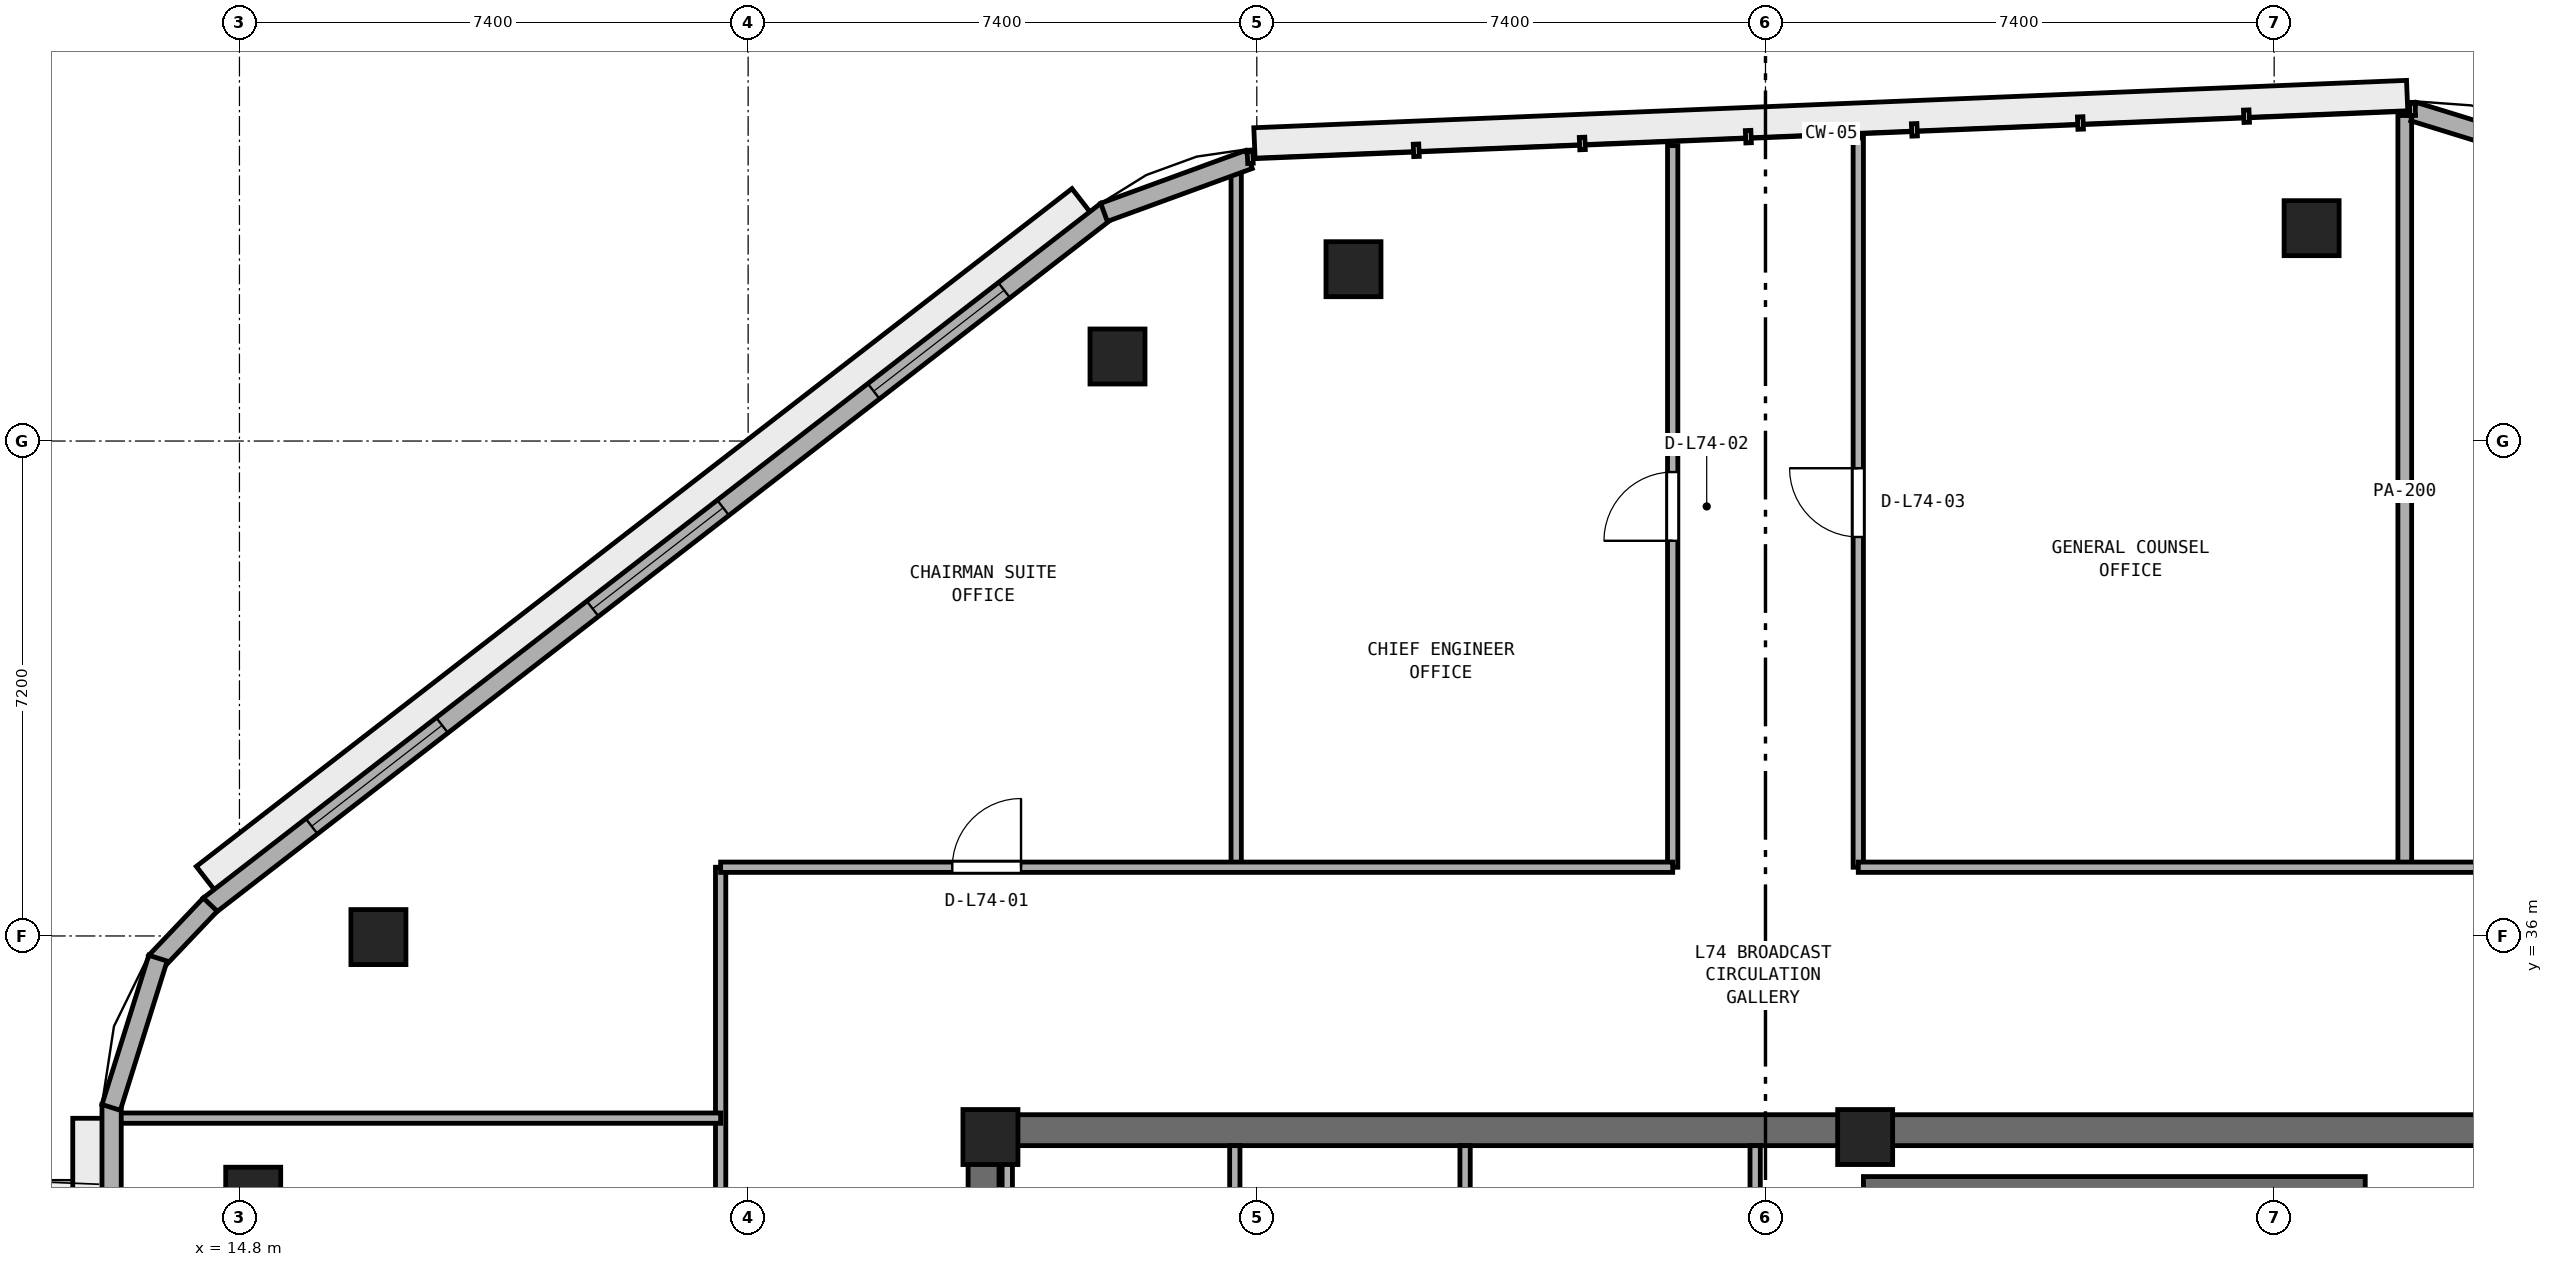
"""IFC4 building model, lengths in metres.
Left out: names, types, materials, properties, quantities, classifications, styles, units other than length and angle.
Written with IfcOpenShell. Run it as: python <this file> out.ifc"""

import sys

from ifc_helpers import new_model, si_unit, direction, frame, frame_2d, origin, origin_2d, place, context, subcontext, project, spatial, rectangle, extrude, element, fill, save


model = new_model("IFC4")
c1 = context("Model", 3, precision=1e-05, world=origin(), true_north=direction((0.0, 1.0)))
c2 = subcontext(c1, "Body", "Model", "MODEL_VIEW")
j1 = project(units=[si_unit("LENGTHUNIT", "METRE"), si_unit("PLANEANGLEUNIT", "RADIAN")], contexts=[c1])
p1 = place(None, origin())
s1 = spatial("IfcSite", under=j1, at=p1, CompositionType="ELEMENT")
p2 = place(p1, origin())
s2 = spatial("IfcBuilding", under=s1, at=p2, CompositionType="ELEMENT")
p3 = place(p2, frame((0.0, 0.0, 289.6)))
s3 = spatial("IfcBuildingStorey", under=s2, at=p3, CompositionType="ELEMENT", Elevation=289.6)
p4 = place(p3, frame((25.4, 33.175, 0.0), z_axis=(0.0, 0.0, 1.0), x_axis=(1.0, 0.0, 0.0)))
e1 = element("IfcWall", 1, at=p4, inside=s3, PredefinedType="SHEAR", context=c2, shape_type="SweptSolid", body=[
    extrude(rectangle(XDim=23.2, YDim=0.45, at=frame_2d((11.6, 0.0))), origin(), (0.0, 0.0, 1.0), 3.54),
])
p5 = place(p3, frame((25.625, 17.45, 0.0), z_axis=(0.0, 0.0, 1.0), x_axis=(0.0, 1.0, 0.0)))
e2 = element("IfcWall", 2, at=p5, inside=s3, PredefinedType="SHEAR", context=c2, shape_type="SweptSolid", body=[
    extrude(rectangle(XDim=15.5, YDim=0.45, at=frame_2d((7.75, 0.0))), origin(), (0.0, 0.0, 1.0), 3.54),
])
p6 = place(p5, frame((7.0, 0.0, 0.0)))
e3 = element("IfcOpeningElement", 3, at=p6, cuts=e2, PredefinedType="OPENING", context=c2, shape_type="SweptSolid", body=[
    extrude(rectangle(XDim=1.5, YDim=2.15, at=frame_2d((0.75, 1.075))), frame((0.0, 0.235, 0.0), z_axis=(0.0, -1.0, 0.0), x_axis=(1.0, 0.0, 0.0)), (0.0, 0.0, 1.0), 0.47),
])
for number, where, z_axis, x_axis in (
    (4, (38.45, 33.075, 0.0), (0.0, 0.0, 1.0), (1.0, 0.0, 0.0)),
    (5, (25.725, 33.075, 0.0), (0.0, 0.0, 1.0), (1.0, 0.0, 0.0)),
):
    element("IfcColumn", number, at=place(p3, frame(where, z_axis=z_axis, x_axis=x_axis)), inside=s3, PredefinedType="PILASTER", context=c2, shape_type="SweptSolid", body=[
        extrude(rectangle(XDim=0.8, YDim=0.8, at=origin_2d()), origin(), (0.0, 0.0, 1.0), 3.8),
    ])
for number, where, z_axis, x_axis in (
    (6, (44.945, 46.297, 0.0), (0.0, 0.0, 1.0), (1.0, 0.0, 0.0)),
    (7, (31.007, 45.7, 0.0), (0.0, 0.0, 1.0), (1.0, 0.0, 0.0)),
    (8, (27.573, 44.43, 0.0), (0.0, 0.0, 1.0), (1.0, 0.0, 0.0)),
    (9, (16.822, 35.984, 0.0), (0.0, 0.0, 1.0), (1.0, 0.0, 0.0)),
    (10, (15.0, 32.236, 0.0), (0.0, 0.0, 1.0), (1.0, 0.0, 0.0)),
):
    element("IfcColumn", number, at=place(p3, frame(where, z_axis=z_axis, x_axis=x_axis)), inside=s3, PredefinedType="COLUMN", context=c2, shape_type="SweptSolid", body=[
        extrude(rectangle(XDim=0.8, YDim=0.8, at=origin_2d()), origin(), (0.0, 0.0, 1.0), 3.8),
    ])
p7 = place(p3, frame((38.425, 32.375, 0.0), z_axis=(0.0, 0.0, 1.0), x_axis=(1.0, 0.0, 0.0)))
e11 = element("IfcWall", 11, at=p7, inside=s3, PredefinedType="SHEAR", context=c2, shape_type="SweptSolid", body=[
    extrude(rectangle(XDim=7.3, YDim=0.25, at=frame_2d((3.65, 0.0))), origin(), (0.0, 0.0, 1.0), 3.54),
])
p8 = place(p3, frame((25.97, 30.65, 0.0), z_axis=(0.0, 0.0, 1.0), x_axis=(0.0, 1.0, 0.0)))
e12 = element("IfcWall", 12, at=p8, inside=s3, PredefinedType="PARTITIONING", context=c2, shape_type="SweptSolid", body=[
    extrude(rectangle(XDim=2.3, YDim=0.15, at=frame_2d((1.15, 0.0))), origin(), (0.0, 0.0, 1.0), 2.64),
])
for number, where, z_axis, x_axis in (
    (13, (29.28, 30.65, 0.0), (0.0, 0.0, 1.0), (0.0, 1.0, 0.0)),
    (14, (32.63, 30.65, 0.0), (0.0, 0.0, 1.0), (0.0, 1.0, 0.0)),
    (15, (36.85, 30.65, 0.0), (0.0, 0.0, 1.0), (0.0, 1.0, 0.0)),
):
    element("IfcWall", number, at=place(p3, frame(where, z_axis=z_axis, x_axis=x_axis)), inside=s3, PredefinedType="PARTITIONING", context=c2, shape_type="SweptSolid", body=[
        extrude(rectangle(XDim=2.3, YDim=0.15, at=frame_2d((1.15, 0.0))), origin(), (0.0, 0.0, 1.0), 3.54),
    ])
p9 = place(p3, frame((46.3, 37.0, 0.0), z_axis=(0.0, 0.0, 1.0), x_axis=(0.0, 1.0, 0.0)))
e16 = element("IfcWall", 16, at=p9, inside=s3, PredefinedType="PARTITIONING", context=c2, shape_type="SweptSolid", body=[
    extrude(rectangle(XDim=10.935, YDim=0.2, at=frame_2d((5.468, 0.0))), origin(), (0.0, 0.0, 1.0), 3.54),
])
p10 = place(p3, frame((38.35, 37.0, 0.0), z_axis=(0.0, 0.0, 1.0), x_axis=(0.0, 1.0, 0.0)))
e17 = element("IfcWall", 17, at=p10, inside=s3, PredefinedType="PARTITIONING", context=c2, shape_type="SweptSolid", body=[
    extrude(rectangle(XDim=10.609, YDim=0.15, at=frame_2d((5.304, 0.0))), origin(), (0.0, 0.0, 1.0), 3.54),
])
p11 = place(p10, frame((4.804, 0.0, 0.0)))
e18 = element("IfcOpeningElement", 18, at=p11, cuts=e17, PredefinedType="OPENING", context=c2, shape_type="SweptSolid", body=[
    extrude(rectangle(XDim=1.0, YDim=2.12, at=frame_2d((0.5, 1.06))), frame((0.0, 0.085, 0.0), z_axis=(0.0, -1.0, 0.0), x_axis=(1.0, 0.0, 0.0)), (0.0, 0.0, 1.0), 0.17),
])
p12 = place(p3, frame((35.65, 37.0, 0.0), z_axis=(0.0, 0.0, 1.0), x_axis=(0.0, 1.0, 0.0)))
e19 = element("IfcWall", 19, at=p12, inside=s3, PredefinedType="PARTITIONING", context=c2, shape_type="SweptSolid", body=[
    extrude(rectangle(XDim=10.498, YDim=0.15, at=frame_2d((5.249, 0.0))), origin(), (0.0, 0.0, 1.0), 3.54),
])
p13 = place(p12, frame((4.749, 0.0, 0.0)))
e20 = element("IfcOpeningElement", 20, at=p13, cuts=e19, PredefinedType="OPENING", context=c2, shape_type="SweptSolid", body=[
    extrude(rectangle(XDim=1.0, YDim=2.12, at=frame_2d((0.5, 1.06))), frame((0.0, 0.085, 0.0), z_axis=(0.0, -1.0, 0.0), x_axis=(1.0, 0.0, 0.0)), (0.0, 0.0, 1.0), 0.17),
])
p14 = place(p3, frame((29.3, 37.0, 0.0), z_axis=(0.0, 0.0, 1.0), x_axis=(0.0, 1.0, 0.0)))
e21 = element("IfcWall", 21, at=p14, inside=s3, PredefinedType="PARTITIONING", context=c2, shape_type="SweptSolid", body=[
    extrude(rectangle(XDim=10.216, YDim=0.15, at=frame_2d((5.108, 0.0))), origin(), (0.0, 0.0, 1.0), 3.54),
])
p15 = place(p3, frame((21.8, 7.79, 0.0), z_axis=(0.0, 0.0, 1.0), x_axis=(0.0, 1.0, 0.0)))
e22 = element("IfcWall", 22, at=p15, inside=s3, PredefinedType="PARTITIONING", context=c2, shape_type="SweptSolid", body=[
    extrude(rectangle(XDim=29.21, YDim=0.15, at=frame_2d((14.605, 0.0))), origin(), (0.0, 0.0, 1.0), 3.54),
])
p16 = place(p15, frame((9.76, 0.0, 0.0)))
e23 = element("IfcOpeningElement", 23, at=p16, cuts=e22, PredefinedType="OPENING", context=c2, shape_type="SweptSolid", body=[
    extrude(rectangle(XDim=0.9, YDim=2.1, at=frame_2d((0.45, 1.05))), frame((0.0, 0.085, 0.0), z_axis=(0.0, -1.0, 0.0), x_axis=(1.0, 0.0, 0.0)), (0.0, 0.0, 1.0), 0.17),
])
p17 = place(p15, frame((18.11, 0.0, 0.0)))
e24 = element("IfcOpeningElement", 24, at=p17, cuts=e22, PredefinedType="OPENING", context=c2, shape_type="SweptSolid", body=[
    extrude(rectangle(XDim=0.9, YDim=2.1, at=frame_2d((0.45, 1.05))), frame((0.0, 0.085, 0.0), z_axis=(0.0, -1.0, 0.0), x_axis=(1.0, 0.0, 0.0)), (0.0, 0.0, 1.0), 0.17),
])
p18 = place(p15, frame((23.485, 0.0, 0.0)))
e25 = element("IfcOpeningElement", 25, at=p18, cuts=e22, PredefinedType="OPENING", context=c2, shape_type="SweptSolid", body=[
    extrude(rectangle(XDim=0.9, YDim=2.1, at=frame_2d((0.45, 1.05))), frame((0.0, 0.085, 0.0), z_axis=(0.0, -1.0, 0.0), x_axis=(1.0, 0.0, 0.0)), (0.0, 0.0, 1.0), 0.17),
])
p19 = place(p3, frame((13.005, 33.35, 0.0), z_axis=(0.0, 0.0, 1.0), x_axis=(1.0, 0.0, 0.0)))
e26 = element("IfcWall", 26, at=p19, inside=s3, PredefinedType="PARTITIONING", context=c2, shape_type="SweptSolid", body=[
    extrude(rectangle(XDim=8.795, YDim=0.15, at=frame_2d((4.397, 0.0))), origin(), (0.0, 0.0, 1.0), 3.54),
])
p20 = place(p3, frame((21.8, 37.0, 0.0), z_axis=(0.0, 0.0, 1.0), x_axis=(1.0, 0.0, 0.0)))
e27 = element("IfcWall", 27, at=p20, inside=s3, PredefinedType="PARTITIONING", context=c2, shape_type="SweptSolid", body=[
    extrude(rectangle(XDim=13.85, YDim=0.15, at=frame_2d((6.925, 0.0))), origin(), (0.0, 0.0, 1.0), 3.54),
])
p21 = place(p20, frame((3.37, 0.0, 0.0)))
e28 = element("IfcOpeningElement", 28, at=p21, cuts=e27, PredefinedType="OPENING", context=c2, shape_type="SweptSolid", body=[
    extrude(rectangle(XDim=1.0, YDim=2.12, at=frame_2d((0.5, 1.06))), frame((0.0, 0.085, 0.0), z_axis=(0.0, -1.0, 0.0), x_axis=(1.0, 0.0, 0.0)), (0.0, 0.0, 1.0), 0.17),
])
p22 = place(p3, frame((38.35, 37.0, 0.0), z_axis=(0.0, 0.0, 1.0), x_axis=(1.0, 0.0, 0.0)))
e29 = element("IfcWall", 29, at=p22, inside=s3, PredefinedType="PARTITIONING", context=c2, shape_type="SweptSolid", body=[
    extrude(rectangle(XDim=13.85, YDim=0.15, at=frame_2d((6.925, 0.0))), origin(), (0.0, 0.0, 1.0), 3.54),
])
p23 = place(p22, frame((10.28, 0.0, 0.0)))
e30 = element("IfcOpeningElement", 30, at=p23, cuts=e29, PredefinedType="OPENING", context=c2, shape_type="SweptSolid", body=[
    extrude(rectangle(XDim=1.0, YDim=2.12, at=frame_2d((0.5, 1.06))), frame((0.0, 0.085, 0.0), z_axis=(0.0, -1.0, 0.0), x_axis=(1.0, 0.0, 0.0)), (0.0, 0.0, 1.0), 0.17),
])
p24 = place(p3, frame((27.415, 46.547, 0.0), z_axis=(0.0, 0.0, 1.0), x_axis=(-0.790789745248, -0.612087884875, 0.0)))
e31 = element("IfcWall", 31, at=p24, inside=s3, PredefinedType="STANDARD", context=c2, shape_type="SweptSolid", body=[
    extrude(rectangle(XDim=16.509, YDim=0.28, at=frame_2d((8.254, 0.0))), origin(), (0.0, 0.0, 1.0), 3.54),
])
p25 = place(p24, frame((1.885, 0.0, 0.9)))
e32 = element("IfcOpeningElement", 32, at=p25, cuts=e31, PredefinedType="OPENING", context=c2, shape_type="SweptSolid", body=[
    extrude(rectangle(XDim=2.4, YDim=1.75, at=frame_2d((1.2, 0.875))), frame((0.0, 0.15, 0.0), z_axis=(0.0, -1.0, 0.0), x_axis=(1.0, 0.0, 0.0)), (0.0, 0.0, 1.0), 0.3),
])
p26 = place(p24, frame((7.055, 0.0, 0.9)))
e33 = element("IfcOpeningElement", 33, at=p26, cuts=e31, PredefinedType="OPENING", context=c2, shape_type="SweptSolid", body=[
    extrude(rectangle(XDim=2.4, YDim=1.75, at=frame_2d((1.2, 0.875))), frame((0.0, 0.15, 0.0), z_axis=(0.0, -1.0, 0.0), x_axis=(1.0, 0.0, 0.0)), (0.0, 0.0, 1.0), 0.3),
])
p27 = place(p24, frame((12.224, 0.0, 0.9)))
e34 = element("IfcOpeningElement", 34, at=p27, cuts=e31, PredefinedType="OPENING", context=c2, shape_type="SweptSolid", body=[
    extrude(rectangle(XDim=2.4, YDim=1.75, at=frame_2d((1.2, 0.875))), frame((0.0, 0.15, 0.0), z_axis=(0.0, -1.0, 0.0), x_axis=(1.0, 0.0, 0.0)), (0.0, 0.0, 1.0), 0.3),
])
p28 = place(p3, frame((12.94, 33.548, 0.0), z_axis=(0.0, 0.0, 1.0), x_axis=(0.0, -1.0, 0.0)))
e35 = element("IfcWall", 35, at=p28, inside=s3, PredefinedType="STANDARD", context=c2, shape_type="SweptSolid", body=[
    extrude(rectangle(XDim=17.496, YDim=0.28, at=frame_2d((8.748, 0.0))), origin(), (0.0, 0.0, 1.0), 3.54),
])
p29 = place(p28, frame((8.198, 0.0, 0.0)))
e36 = element("IfcOpeningElement", 36, at=p29, cuts=e35, PredefinedType="OPENING", context=c2, shape_type="SweptSolid", body=[
    extrude(rectangle(XDim=1.1, YDim=2.2, at=frame_2d((0.55, 1.1))), frame((0.0, 0.15, 0.0), z_axis=(0.0, -1.0, 0.0), x_axis=(1.0, 0.0, 0.0)), (0.0, 0.0, 1.0), 0.3),
])
p30 = place(p28, frame((13.047, 0.0, 0.9)))
e37 = element("IfcOpeningElement", 37, at=p30, cuts=e35, PredefinedType="OPENING", context=c2, shape_type="SweptSolid", body=[
    extrude(rectangle(XDim=2.4, YDim=1.75, at=frame_2d((1.2, 0.875))), frame((0.0, 0.15, 0.0), z_axis=(0.0, -1.0, 0.0), x_axis=(1.0, 0.0, 0.0)), (0.0, 0.0, 1.0), 0.3),
])
p31 = place(p3, frame((48.79, 47.264, 0.0), z_axis=(0.0, 0.0, 1.0), x_axis=(-0.955575823363, 0.294745391489, 0.0)))
e38 = element("IfcWall", 38, at=p31, inside=s3, PredefinedType="STANDARD", context=c2, shape_type="SweptSolid", body=[
    extrude(rectangle(XDim=2.471, YDim=0.28, at=frame_2d((1.235, 0.0))), origin(), (0.0, 0.0, 1.0), 3.54),
])
p32 = place(p3, frame((29.486, 47.296, 0.0), z_axis=(0.0, 0.0, 1.0), x_axis=(-0.939434048497, -0.342729731019, 0.0)))
e39 = element("IfcWall", 39, at=p32, inside=s3, PredefinedType="STANDARD", context=c2, shape_type="SweptSolid", body=[
    extrude(rectangle(XDim=2.245, YDim=0.28, at=frame_2d((1.122, 0.0))), origin(), (0.0, 0.0, 1.0), 3.54),
])
p33 = place(p3, frame((14.375, 36.457, 0.0), z_axis=(0.0, 0.0, 1.0), x_axis=(-0.68895569752, -0.724803453948, 0.0)))
e40 = element("IfcWall", 40, at=p33, inside=s3, PredefinedType="STANDARD", context=c2, shape_type="SweptSolid", body=[
    extrude(rectangle(XDim=1.151, YDim=0.28, at=frame_2d((0.575, 0.0))), origin(), (0.0, 0.0, 1.0), 3.54),
])
p34 = place(p3, frame((13.615, 35.677, 0.0), z_axis=(0.0, 0.0, 1.0), x_axis=(-0.299374552426, -0.954135670311, 0.0)))
e41 = element("IfcWall", 41, at=p34, inside=s3, PredefinedType="STANDARD", context=c2, shape_type="SweptSolid", body=[
    extrude(rectangle(XDim=2.275, YDim=0.28, at=frame_2d((1.138, 0.0))), origin(), (0.0, 0.0, 1.0), 3.54),
])
p35 = place(p21, origin())
e42 = element("IfcDoor", 42, at=p35, inside=s3, OperationType="SINGLE_SWING_RIGHT", PredefinedType="DOOR", context=c2, shape_type="SweptSolid", body=[
    extrude(rectangle(XDim=1.0, YDim=2.12, at=frame_2d((0.5, 1.06))), frame((0.0, 0.025, 0.0), z_axis=(0.0, -1.0, 0.0), x_axis=(1.0, 0.0, 0.0)), (0.0, 0.0, 1.0), 0.05),
])
fill(e28, e42)
p36 = place(p13, origin())
e43 = element("IfcDoor", 43, at=p36, inside=s3, OperationType="SINGLE_SWING_LEFT", PredefinedType="DOOR", context=c2, shape_type="SweptSolid", body=[
    extrude(rectangle(XDim=1.0, YDim=2.12, at=frame_2d((0.5, 1.06))), frame((0.0, 0.025, 0.0), z_axis=(0.0, -1.0, 0.0), x_axis=(1.0, 0.0, 0.0)), (0.0, 0.0, 1.0), 0.05),
])
fill(e20, e43)
p37 = place(p11, origin())
e44 = element("IfcDoor", 44, at=p37, inside=s3, OperationType="SINGLE_SWING_RIGHT", PredefinedType="DOOR", context=c2, shape_type="SweptSolid", body=[
    extrude(rectangle(XDim=1.0, YDim=2.12, at=frame_2d((0.5, 1.06))), frame((0.0, 0.025, 0.0), z_axis=(0.0, -1.0, 0.0), x_axis=(1.0, 0.0, 0.0)), (0.0, 0.0, 1.0), 0.05),
])
fill(e18, e44)
p38 = place(p25, origin())
e45 = element("IfcWindow", 45, at=p38, inside=s3, PartitioningType="SINGLE_PANEL", PredefinedType="WINDOW", context=c2, shape_type="SweptSolid", body=[
    extrude(rectangle(XDim=2.4, YDim=1.75, at=frame_2d((1.2, 0.875))), frame((0.0, 0.03, 0.0), z_axis=(0.0, -1.0, 0.0), x_axis=(1.0, 0.0, 0.0)), (0.0, 0.0, 1.0), 0.06),
])
fill(e32, e45)
p39 = place(p26, origin())
e46 = element("IfcWindow", 46, at=p39, inside=s3, PartitioningType="SINGLE_PANEL", PredefinedType="WINDOW", context=c2, shape_type="SweptSolid", body=[
    extrude(rectangle(XDim=2.4, YDim=1.75, at=frame_2d((1.2, 0.875))), frame((0.0, 0.03, 0.0), z_axis=(0.0, -1.0, 0.0), x_axis=(1.0, 0.0, 0.0)), (0.0, 0.0, 1.0), 0.06),
])
fill(e33, e46)
p40 = place(p27, origin())
e47 = element("IfcWindow", 47, at=p40, inside=s3, PartitioningType="SINGLE_PANEL", PredefinedType="WINDOW", context=c2, shape_type="SweptSolid", body=[
    extrude(rectangle(XDim=2.4, YDim=1.75, at=frame_2d((1.2, 0.875))), frame((0.0, 0.03, 0.0), z_axis=(0.0, -1.0, 0.0), x_axis=(1.0, 0.0, 0.0)), (0.0, 0.0, 1.0), 0.06),
])
fill(e34, e47)
save(model, sys.argv[1])
